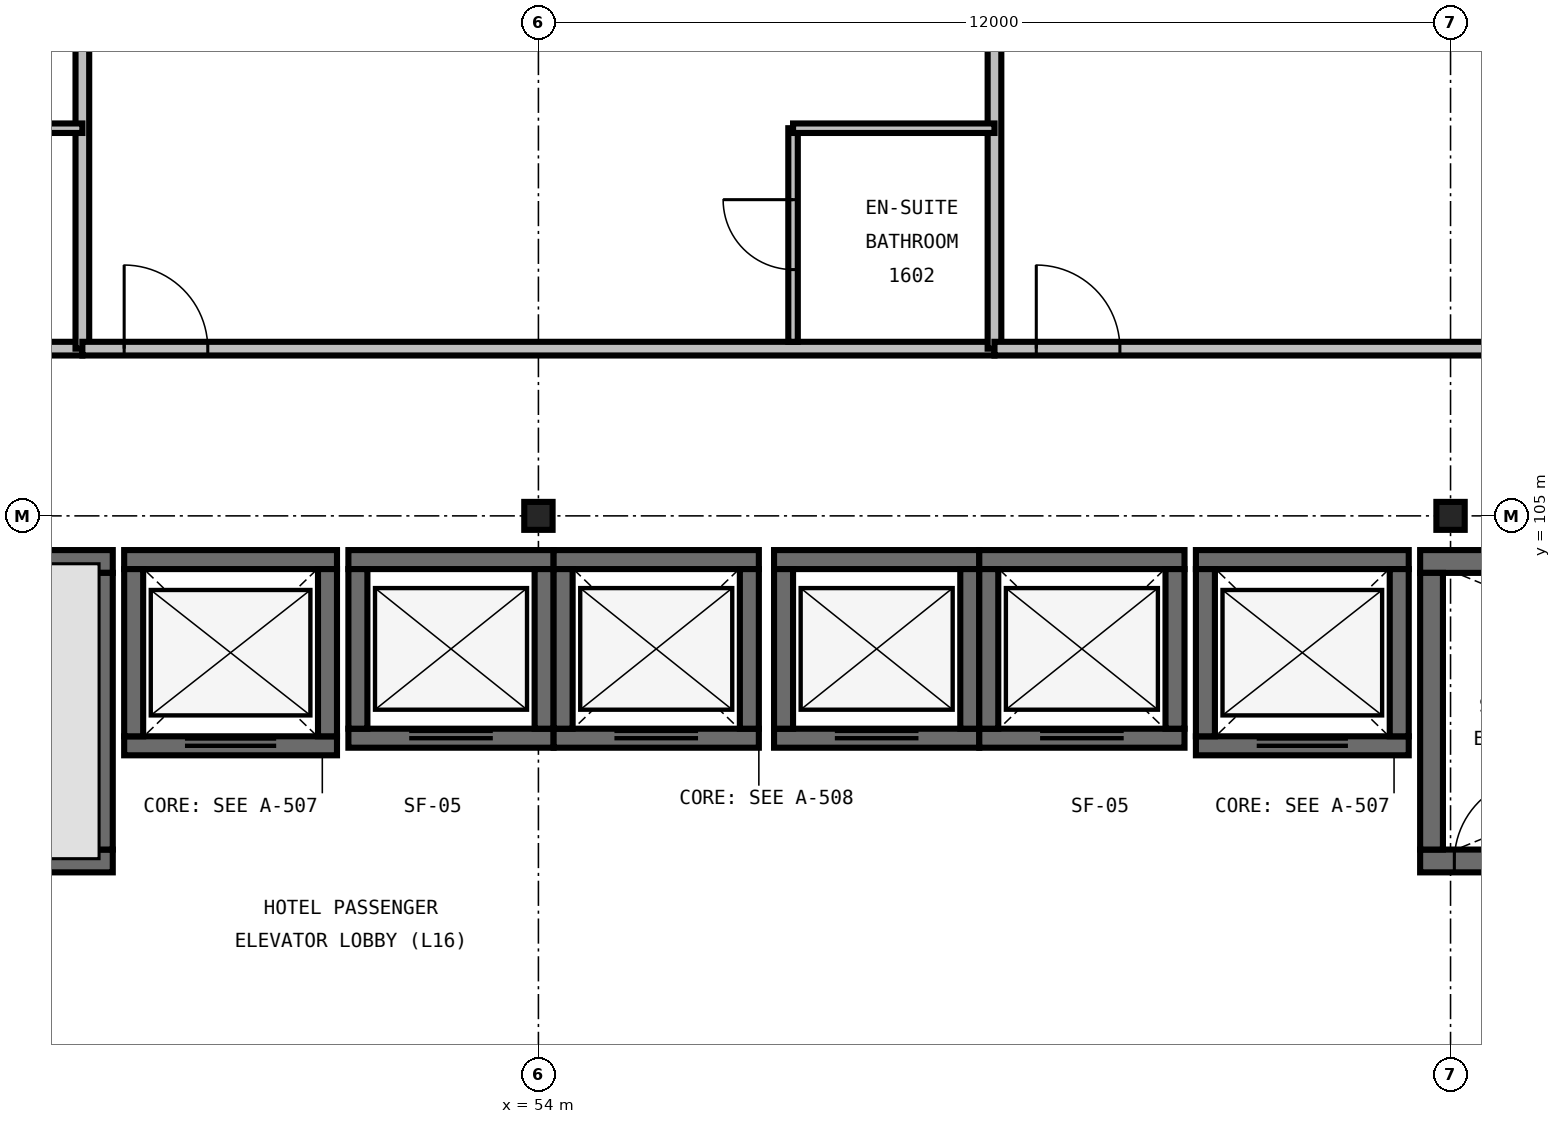
"""IFC4 building model, lengths in metres.
Left out: names, types, materials, properties, quantities, classifications, styles, units other than length and angle.
Written with IfcOpenShell. Run it as: python <this file> out.ifc"""

import sys

from ifc_helpers import new_model, si_unit, direction, frame, frame_2d, origin, origin_2d, place, context, subcontext, project, spatial, rectangle, i_section, extrude, element, fill, save


model = new_model("IFC4")
c1 = context("Model", 3, precision=1e-05, world=origin(), true_north=direction((0.0, 1.0)))
c2 = subcontext(c1, "Body", "Model", "MODEL_VIEW")
j1 = project(units=[si_unit("LENGTHUNIT", "METRE"), si_unit("PLANEANGLEUNIT", "RADIAN")], contexts=[c1])
p1 = place(None, origin())
s1 = spatial("IfcSite", under=j1, at=p1, CompositionType="ELEMENT")
p2 = place(p1, origin())
s2 = spatial("IfcBuilding", under=s1, at=p2, CompositionType="ELEMENT")
p3 = place(p2, frame((0.0, 0.0, 67.2)))
s3 = spatial("IfcBuildingStorey", under=s2, at=p3, CompositionType="ELEMENT", Elevation=67.2)
for number, where, z_axis, x_axis in (
    (1, (54.0, 105.0, 0.0), (0.0, 0.0, 1.0), (1.0, 0.0, 0.0)),
    (2, (66.0, 105.0, 0.0), (0.0, 0.0, 1.0), (1.0, 0.0, 0.0)),
):
    element("IfcColumn", number, at=place(p3, frame(where, z_axis=z_axis, x_axis=x_axis)), inside=s3, PredefinedType="COLUMN", context=c2, shape_type="SweptSolid", body=[
        extrude(i_section(OverallWidth=0.373, OverallDepth=0.368, WebThickness=0.015, FlangeThickness=0.024, FilletRadius=0.031, at=origin_2d()), origin(), (0.0, 0.0, 1.0), 3.6),
    ])
p4 = place(p3, frame((38.6, 100.46, 0.0), z_axis=(0.0, 0.0, 1.0), x_axis=(1.0, 0.0, 0.0)))
e3 = element("IfcWall", 3, at=p4, inside=s3, PredefinedType="SHEAR", context=c2, shape_type="SweptSolid", body=[
    extrude(rectangle(XDim=9.8, YDim=0.3, at=frame_2d((4.9, 0.0))), origin(), (0.0, 0.0, 1.0), 3.6),
])
p5 = place(p4, frame((0.45, 0.0, 0.0)))
e4 = element("IfcOpeningElement", 4, at=p5, cuts=e3, PredefinedType="OPENING", context=c2, shape_type="SweptSolid", body=[
    extrude(rectangle(XDim=1.1, YDim=2.2, at=frame_2d((0.55, 1.1))), frame((0.0, 0.165, 0.0), z_axis=(0.0, -1.0, 0.0), x_axis=(1.0, 0.0, 0.0)), (0.0, 0.0, 1.0), 0.33),
])
p6 = place(p3, frame((48.4, 104.4, 0.0), z_axis=(0.0, 0.0, 1.0), x_axis=(-1.0, 0.0, 0.0)))
e5 = element("IfcWall", 5, at=p6, inside=s3, PredefinedType="SHEAR", context=c2, shape_type="SweptSolid", body=[
    extrude(rectangle(XDim=9.8, YDim=0.3, at=frame_2d((4.9, 0.0))), origin(), (0.0, 0.0, 1.0), 3.6),
])
p7 = place(p3, frame((48.25, 100.61, 0.0), z_axis=(0.0, 0.0, 1.0), x_axis=(0.0, 1.0, 0.0)))
e6 = element("IfcWall", 6, at=p7, inside=s3, PredefinedType="SHEAR", context=c2, shape_type="SweptSolid", body=[
    extrude(rectangle(XDim=3.64, YDim=0.3, at=frame_2d((1.82, 0.0))), origin(), (0.0, 0.0, 1.0), 3.6),
])
p8 = place(p3, frame((65.6, 100.46, 0.0), z_axis=(0.0, 0.0, 1.0), x_axis=(1.0, 0.0, 0.0)))
e7 = element("IfcWall", 7, at=p8, inside=s3, PredefinedType="SHEAR", context=c2, shape_type="SweptSolid", body=[
    extrude(rectangle(XDim=9.8, YDim=0.3, at=frame_2d((4.9, 0.0))), origin(), (0.0, 0.0, 1.0), 3.6),
])
p9 = place(p8, frame((0.45, 0.0, 0.0)))
e8 = element("IfcOpeningElement", 8, at=p9, cuts=e7, PredefinedType="OPENING", context=c2, shape_type="SweptSolid", body=[
    extrude(rectangle(XDim=1.1, YDim=2.2, at=frame_2d((0.55, 1.1))), frame((0.0, 0.165, 0.0), z_axis=(0.0, -1.0, 0.0), x_axis=(1.0, 0.0, 0.0)), (0.0, 0.0, 1.0), 0.33),
])
p10 = place(p3, frame((75.4, 104.4, 0.0), z_axis=(0.0, 0.0, 1.0), x_axis=(-1.0, 0.0, 0.0)))
e9 = element("IfcWall", 9, at=p10, inside=s3, PredefinedType="SHEAR", context=c2, shape_type="SweptSolid", body=[
    extrude(rectangle(XDim=9.8, YDim=0.3, at=frame_2d((4.9, 0.0))), origin(), (0.0, 0.0, 1.0), 3.6),
])
p11 = place(p3, frame((65.75, 104.25, 0.0), z_axis=(0.0, 0.0, 1.0), x_axis=(0.0, -1.0, 0.0)))
e10 = element("IfcWall", 10, at=p11, inside=s3, PredefinedType="SHEAR", context=c2, shape_type="SweptSolid", body=[
    extrude(rectangle(XDim=3.64, YDim=0.3, at=frame_2d((1.82, 0.0))), origin(), (0.0, 0.0, 1.0), 3.6),
])
p12 = place(p3, frame((48.55, 101.975, 0.0), z_axis=(0.0, 0.0, 1.0), x_axis=(1.0, 0.0, 0.0)))
e11 = element("IfcWall", 11, at=p12, inside=s3, PredefinedType="SHEAR", context=c2, shape_type="SweptSolid", body=[
    extrude(rectangle(XDim=2.8, YDim=0.25, at=frame_2d((1.4, 0.0))), origin(), (0.0, 0.0, 1.0), 3.6),
])
p13 = place(p12, frame((0.8, 0.0, 0.0)))
e12 = element("IfcOpeningElement", 12, at=p13, cuts=e11, PredefinedType="OPENING", context=c2, shape_type="SweptSolid", body=[
    extrude(rectangle(XDim=1.2, YDim=2.2, at=frame_2d((0.6, 1.1))), frame((0.0, 0.14, 0.0), z_axis=(0.0, -1.0, 0.0), x_axis=(1.0, 0.0, 0.0)), (0.0, 0.0, 1.0), 0.28),
])
p14 = place(p3, frame((51.35, 104.425, 0.0), z_axis=(0.0, 0.0, 1.0), x_axis=(-1.0, 0.0, 0.0)))
e13 = element("IfcWall", 13, at=p14, inside=s3, PredefinedType="SHEAR", context=c2, shape_type="SweptSolid", body=[
    extrude(rectangle(XDim=2.8, YDim=0.25, at=frame_2d((1.4, 0.0))), origin(), (0.0, 0.0, 1.0), 3.6),
])
for number, where, z_axis, x_axis in (
    (14, (48.675, 104.3, 0.0), (0.0, 0.0, 1.0), (0.0, -1.0, 0.0)),
    (15, (51.225, 102.1, 0.0), (0.0, 0.0, 1.0), (0.0, 1.0, 0.0)),
):
    element("IfcWall", number, at=place(p3, frame(where, z_axis=z_axis, x_axis=x_axis)), inside=s3, PredefinedType="SHEAR", context=c2, shape_type="SweptSolid", body=[
        extrude(rectangle(XDim=2.2, YDim=0.25, at=frame_2d((1.1, 0.0))), origin(), (0.0, 0.0, 1.0), 3.6),
    ])
p15 = place(p3, frame((62.65, 101.975, 0.0), z_axis=(0.0, 0.0, 1.0), x_axis=(1.0, 0.0, 0.0)))
e16 = element("IfcWall", 16, at=p15, inside=s3, PredefinedType="SHEAR", context=c2, shape_type="SweptSolid", body=[
    extrude(rectangle(XDim=2.8, YDim=0.25, at=frame_2d((1.4, 0.0))), origin(), (0.0, 0.0, 1.0), 3.6),
])
p16 = place(p15, frame((0.8, 0.0, 0.0)))
e17 = element("IfcOpeningElement", 17, at=p16, cuts=e16, PredefinedType="OPENING", context=c2, shape_type="SweptSolid", body=[
    extrude(rectangle(XDim=1.2, YDim=2.2, at=frame_2d((0.6, 1.1))), frame((0.0, 0.14, 0.0), z_axis=(0.0, -1.0, 0.0), x_axis=(1.0, 0.0, 0.0)), (0.0, 0.0, 1.0), 0.28),
])
p17 = place(p3, frame((65.45, 104.425, 0.0), z_axis=(0.0, 0.0, 1.0), x_axis=(-1.0, 0.0, 0.0)))
e18 = element("IfcWall", 18, at=p17, inside=s3, PredefinedType="SHEAR", context=c2, shape_type="SweptSolid", body=[
    extrude(rectangle(XDim=2.8, YDim=0.25, at=frame_2d((1.4, 0.0))), origin(), (0.0, 0.0, 1.0), 3.6),
])
for number, where, z_axis, x_axis in (
    (19, (62.775, 104.3, 0.0), (0.0, 0.0, 1.0), (0.0, -1.0, 0.0)),
    (20, (65.325, 102.1, 0.0), (0.0, 0.0, 1.0), (0.0, 1.0, 0.0)),
):
    element("IfcWall", number, at=place(p3, frame(where, z_axis=z_axis, x_axis=x_axis)), inside=s3, PredefinedType="SHEAR", context=c2, shape_type="SweptSolid", body=[
        extrude(rectangle(XDim=2.2, YDim=0.25, at=frame_2d((1.1, 0.0))), origin(), (0.0, 0.0, 1.0), 3.6),
    ])
p18 = place(p3, frame((51.5, 102.075, 0.0), z_axis=(0.0, 0.0, 1.0), x_axis=(1.0, 0.0, 0.0)))
e21 = element("IfcWall", 21, at=p18, inside=s3, PredefinedType="SHEAR", context=c2, shape_type="SweptSolid", body=[
    extrude(rectangle(XDim=2.7, YDim=0.25, at=frame_2d((1.35, 0.0))), origin(), (0.0, 0.0, 1.0), 3.6),
])
p19 = place(p18, frame((0.8, 0.0, 0.0)))
e22 = element("IfcOpeningElement", 22, at=p19, cuts=e21, PredefinedType="OPENING", context=c2, shape_type="SweptSolid", body=[
    extrude(rectangle(XDim=1.1, YDim=2.2, at=frame_2d((0.55, 1.1))), frame((0.0, 0.14, 0.0), z_axis=(0.0, -1.0, 0.0), x_axis=(1.0, 0.0, 0.0)), (0.0, 0.0, 1.0), 0.28),
])
p20 = place(p3, frame((54.2, 104.425, 0.0), z_axis=(0.0, 0.0, 1.0), x_axis=(-1.0, 0.0, 0.0)))
e23 = element("IfcWall", 23, at=p20, inside=s3, PredefinedType="SHEAR", context=c2, shape_type="SweptSolid", body=[
    extrude(rectangle(XDim=2.7, YDim=0.25, at=frame_2d((1.35, 0.0))), origin(), (0.0, 0.0, 1.0), 3.6),
])
for number, where, z_axis, x_axis in (
    (24, (51.625, 104.3, 0.0), (0.0, 0.0, 1.0), (0.0, -1.0, 0.0)),
    (25, (54.075, 102.2, 0.0), (0.0, 0.0, 1.0), (0.0, 1.0, 0.0)),
):
    element("IfcWall", number, at=place(p3, frame(where, z_axis=z_axis, x_axis=x_axis)), inside=s3, PredefinedType="SHEAR", context=c2, shape_type="SweptSolid", body=[
        extrude(rectangle(XDim=2.1, YDim=0.25, at=frame_2d((1.05, 0.0))), origin(), (0.0, 0.0, 1.0), 3.6),
    ])
p21 = place(p3, frame((54.2, 102.075, 0.0), z_axis=(0.0, 0.0, 1.0), x_axis=(1.0, 0.0, 0.0)))
e26 = element("IfcWall", 26, at=p21, inside=s3, PredefinedType="SHEAR", context=c2, shape_type="SweptSolid", body=[
    extrude(rectangle(XDim=2.7, YDim=0.25, at=frame_2d((1.35, 0.0))), origin(), (0.0, 0.0, 1.0), 3.6),
])
p22 = place(p21, frame((0.8, 0.0, 0.0)))
e27 = element("IfcOpeningElement", 27, at=p22, cuts=e26, PredefinedType="OPENING", context=c2, shape_type="SweptSolid", body=[
    extrude(rectangle(XDim=1.1, YDim=2.2, at=frame_2d((0.55, 1.1))), frame((0.0, 0.14, 0.0), z_axis=(0.0, -1.0, 0.0), x_axis=(1.0, 0.0, 0.0)), (0.0, 0.0, 1.0), 0.28),
])
p23 = place(p3, frame((56.9, 104.425, 0.0), z_axis=(0.0, 0.0, 1.0), x_axis=(-1.0, 0.0, 0.0)))
e28 = element("IfcWall", 28, at=p23, inside=s3, PredefinedType="SHEAR", context=c2, shape_type="SweptSolid", body=[
    extrude(rectangle(XDim=2.7, YDim=0.25, at=frame_2d((1.35, 0.0))), origin(), (0.0, 0.0, 1.0), 3.6),
])
for number, where, z_axis, x_axis in (
    (29, (54.325, 104.3, 0.0), (0.0, 0.0, 1.0), (0.0, -1.0, 0.0)),
    (30, (56.775, 102.2, 0.0), (0.0, 0.0, 1.0), (0.0, 1.0, 0.0)),
):
    element("IfcWall", number, at=place(p3, frame(where, z_axis=z_axis, x_axis=x_axis)), inside=s3, PredefinedType="SHEAR", context=c2, shape_type="SweptSolid", body=[
        extrude(rectangle(XDim=2.1, YDim=0.25, at=frame_2d((1.05, 0.0))), origin(), (0.0, 0.0, 1.0), 3.6),
    ])
p24 = place(p3, frame((57.1, 102.075, 0.0), z_axis=(0.0, 0.0, 1.0), x_axis=(1.0, 0.0, 0.0)))
e31 = element("IfcWall", 31, at=p24, inside=s3, PredefinedType="SHEAR", context=c2, shape_type="SweptSolid", body=[
    extrude(rectangle(XDim=2.7, YDim=0.25, at=frame_2d((1.35, 0.0))), origin(), (0.0, 0.0, 1.0), 3.6),
])
p25 = place(p24, frame((0.8, 0.0, 0.0)))
e32 = element("IfcOpeningElement", 32, at=p25, cuts=e31, PredefinedType="OPENING", context=c2, shape_type="SweptSolid", body=[
    extrude(rectangle(XDim=1.1, YDim=2.2, at=frame_2d((0.55, 1.1))), frame((0.0, 0.14, 0.0), z_axis=(0.0, -1.0, 0.0), x_axis=(1.0, 0.0, 0.0)), (0.0, 0.0, 1.0), 0.28),
])
p26 = place(p3, frame((59.8, 104.425, 0.0), z_axis=(0.0, 0.0, 1.0), x_axis=(-1.0, 0.0, 0.0)))
e33 = element("IfcWall", 33, at=p26, inside=s3, PredefinedType="SHEAR", context=c2, shape_type="SweptSolid", body=[
    extrude(rectangle(XDim=2.7, YDim=0.25, at=frame_2d((1.35, 0.0))), origin(), (0.0, 0.0, 1.0), 3.6),
])
for number, where, z_axis, x_axis in (
    (34, (57.225, 104.3, 0.0), (0.0, 0.0, 1.0), (0.0, -1.0, 0.0)),
    (35, (59.675, 102.2, 0.0), (0.0, 0.0, 1.0), (0.0, 1.0, 0.0)),
):
    element("IfcWall", number, at=place(p3, frame(where, z_axis=z_axis, x_axis=x_axis)), inside=s3, PredefinedType="SHEAR", context=c2, shape_type="SweptSolid", body=[
        extrude(rectangle(XDim=2.1, YDim=0.25, at=frame_2d((1.05, 0.0))), origin(), (0.0, 0.0, 1.0), 3.6),
    ])
p27 = place(p3, frame((59.8, 102.075, 0.0), z_axis=(0.0, 0.0, 1.0), x_axis=(1.0, 0.0, 0.0)))
e36 = element("IfcWall", 36, at=p27, inside=s3, PredefinedType="SHEAR", context=c2, shape_type="SweptSolid", body=[
    extrude(rectangle(XDim=2.7, YDim=0.25, at=frame_2d((1.35, 0.0))), origin(), (0.0, 0.0, 1.0), 3.6),
])
p28 = place(p27, frame((0.8, 0.0, 0.0)))
e37 = element("IfcOpeningElement", 37, at=p28, cuts=e36, PredefinedType="OPENING", context=c2, shape_type="SweptSolid", body=[
    extrude(rectangle(XDim=1.1, YDim=2.2, at=frame_2d((0.55, 1.1))), frame((0.0, 0.14, 0.0), z_axis=(0.0, -1.0, 0.0), x_axis=(1.0, 0.0, 0.0)), (0.0, 0.0, 1.0), 0.28),
])
p29 = place(p3, frame((62.5, 104.425, 0.0), z_axis=(0.0, 0.0, 1.0), x_axis=(-1.0, 0.0, 0.0)))
e38 = element("IfcWall", 38, at=p29, inside=s3, PredefinedType="SHEAR", context=c2, shape_type="SweptSolid", body=[
    extrude(rectangle(XDim=2.7, YDim=0.25, at=frame_2d((1.35, 0.0))), origin(), (0.0, 0.0, 1.0), 3.6),
])
for number, where, z_axis, x_axis in (
    (39, (59.925, 104.3, 0.0), (0.0, 0.0, 1.0), (0.0, -1.0, 0.0)),
    (40, (62.375, 102.2, 0.0), (0.0, 0.0, 1.0), (0.0, 1.0, 0.0)),
):
    element("IfcWall", number, at=place(p3, frame(where, z_axis=z_axis, x_axis=x_axis)), inside=s3, PredefinedType="SHEAR", context=c2, shape_type="SweptSolid", body=[
        extrude(rectangle(XDim=2.1, YDim=0.25, at=frame_2d((1.05, 0.0))), origin(), (0.0, 0.0, 1.0), 3.6),
    ])
p30 = place(p3, frame((36.085, 107.2, 0.0), z_axis=(0.0, 0.0, 1.0), x_axis=(1.0, 0.0, 0.0)))
e41 = element("IfcWall", 41, at=p30, inside=s3, PredefinedType="PARTITIONING", context=c2, shape_type="SweptSolid", body=[
    extrude(rectangle(XDim=11.915, YDim=0.18, at=frame_2d((5.957, 0.0))), origin(), (0.0, 0.0, 1.0), 3.28),
])
p31 = place(p30, frame((0.55, 0.0, 0.0)))
e42 = element("IfcOpeningElement", 42, at=p31, cuts=e41, PredefinedType="OPENING", context=c2, shape_type="SweptSolid", body=[
    extrude(rectangle(XDim=1.1, YDim=2.2, at=frame_2d((0.55, 1.1))), frame((0.0, 0.105, 0.0), z_axis=(0.0, -1.0, 0.0), x_axis=(1.0, 0.0, 0.0)), (0.0, 0.0, 1.0), 0.21),
])
p32 = place(p3, frame((48.0, 107.2, 0.0), z_axis=(0.0, 0.0, 1.0), x_axis=(0.0, 1.0, 0.0)))
e43 = element("IfcWall", 43, at=p32, inside=s3, PredefinedType="PARTITIONING", context=c2, shape_type="SweptSolid", body=[
    extrude(rectangle(XDim=9.64, YDim=0.18, at=frame_2d((4.82, 0.0))), origin(), (0.0, 0.0, 1.0), 3.28),
])
p33 = place(p3, frame((45.35, 110.1, 0.0), z_axis=(0.0, 0.0, 1.0), x_axis=(1.0, 0.0, 0.0)))
e44 = element("IfcWall", 44, at=p33, inside=s3, PredefinedType="PARTITIONING", context=c2, shape_type="SweptSolid", body=[
    extrude(rectangle(XDim=2.65, YDim=0.125, at=frame_2d((1.325, 0.0))), origin(), (0.0, 0.0, 1.0), 3.28),
])
p34 = place(p3, frame((48.0, 107.2, 0.0), z_axis=(0.0, 0.0, 1.0), x_axis=(1.0, 0.0, 0.0)))
e45 = element("IfcWall", 45, at=p34, inside=s3, PredefinedType="PARTITIONING", context=c2, shape_type="SweptSolid", body=[
    extrude(rectangle(XDim=12.0, YDim=0.18, at=frame_2d((6.0, 0.0))), origin(), (0.0, 0.0, 1.0), 3.28),
])
p35 = place(p34, frame((0.55, 0.0, 0.0)))
e46 = element("IfcOpeningElement", 46, at=p35, cuts=e45, PredefinedType="OPENING", context=c2, shape_type="SweptSolid", body=[
    extrude(rectangle(XDim=1.1, YDim=2.2, at=frame_2d((0.55, 1.1))), frame((0.0, 0.105, 0.0), z_axis=(0.0, -1.0, 0.0), x_axis=(1.0, 0.0, 0.0)), (0.0, 0.0, 1.0), 0.21),
])
p36 = place(p3, frame((60.0, 107.2, 0.0), z_axis=(0.0, 0.0, 1.0), x_axis=(0.0, 1.0, 0.0)))
e47 = element("IfcWall", 47, at=p36, inside=s3, PredefinedType="PARTITIONING", context=c2, shape_type="SweptSolid", body=[
    extrude(rectangle(XDim=9.64, YDim=0.18, at=frame_2d((4.82, 0.0))), origin(), (0.0, 0.0, 1.0), 3.28),
])
p37 = place(p3, frame((57.35, 107.29, 0.0), z_axis=(0.0, 0.0, 1.0), x_axis=(0.0, 1.0, 0.0)))
e48 = element("IfcWall", 48, at=p37, inside=s3, PredefinedType="PARTITIONING", context=c2, shape_type="SweptSolid", body=[
    extrude(rectangle(XDim=2.81, YDim=0.125, at=frame_2d((1.405, 0.0))), origin(), (0.0, 0.0, 1.0), 3.28),
])
p38 = place(p37, frame((0.95, 0.0, 0.0)))
e49 = element("IfcOpeningElement", 49, at=p38, cuts=e48, PredefinedType="OPENING", context=c2, shape_type="SweptSolid", body=[
    extrude(rectangle(XDim=0.92, YDim=2.1, at=frame_2d((0.46, 1.05))), frame((0.0, 0.077, 0.0), z_axis=(0.0, -1.0, 0.0), x_axis=(1.0, 0.0, 0.0)), (0.0, 0.0, 1.0), 0.155),
])
p39 = place(p3, frame((57.35, 110.1, 0.0), z_axis=(0.0, 0.0, 1.0), x_axis=(1.0, 0.0, 0.0)))
e50 = element("IfcWall", 50, at=p39, inside=s3, PredefinedType="PARTITIONING", context=c2, shape_type="SweptSolid", body=[
    extrude(rectangle(XDim=2.65, YDim=0.125, at=frame_2d((1.325, 0.0))), origin(), (0.0, 0.0, 1.0), 3.28),
])
p40 = place(p3, frame((60.0, 107.2, 0.0), z_axis=(0.0, 0.0, 1.0), x_axis=(1.0, 0.0, 0.0)))
e51 = element("IfcWall", 51, at=p40, inside=s3, PredefinedType="PARTITIONING", context=c2, shape_type="SweptSolid", body=[
    extrude(rectangle(XDim=12.0, YDim=0.18, at=frame_2d((6.0, 0.0))), origin(), (0.0, 0.0, 1.0), 3.28),
])
p41 = place(p40, frame((0.55, 0.0, 0.0)))
e52 = element("IfcOpeningElement", 52, at=p41, cuts=e51, PredefinedType="OPENING", context=c2, shape_type="SweptSolid", body=[
    extrude(rectangle(XDim=1.1, YDim=2.2, at=frame_2d((0.55, 1.1))), frame((0.0, 0.105, 0.0), z_axis=(0.0, -1.0, 0.0), x_axis=(1.0, 0.0, 0.0)), (0.0, 0.0, 1.0), 0.21),
])
p42 = place(p9, origin())
e53 = element("IfcDoor", 53, at=p42, inside=s3, OperationType="SINGLE_SWING_RIGHT", PredefinedType="DOOR", context=c2, shape_type="SweptSolid", body=[
    extrude(rectangle(XDim=1.1, YDim=2.2, at=frame_2d((0.55, 1.1))), frame((0.0, 0.025, 0.0), z_axis=(0.0, -1.0, 0.0), x_axis=(1.0, 0.0, 0.0)), (0.0, 0.0, 1.0), 0.05),
])
fill(e8, e53)
p43 = place(p13, origin())
e54 = element("IfcDoor", 54, at=p43, inside=s3, OperationType="DOUBLE_DOOR_SLIDING", PredefinedType="DOOR", context=c2, shape_type="SweptSolid", body=[
    extrude(rectangle(XDim=1.2, YDim=2.2, at=frame_2d((0.6, 1.1))), frame((0.0, 0.025, 0.0), z_axis=(0.0, -1.0, 0.0), x_axis=(1.0, 0.0, 0.0)), (0.0, 0.0, 1.0), 0.05),
])
fill(e12, e54)
p44 = place(p16, origin())
e55 = element("IfcDoor", 55, at=p44, inside=s3, OperationType="DOUBLE_DOOR_SLIDING", PredefinedType="DOOR", context=c2, shape_type="SweptSolid", body=[
    extrude(rectangle(XDim=1.2, YDim=2.2, at=frame_2d((0.6, 1.1))), frame((0.0, 0.025, 0.0), z_axis=(0.0, -1.0, 0.0), x_axis=(1.0, 0.0, 0.0)), (0.0, 0.0, 1.0), 0.05),
])
fill(e17, e55)
p45 = place(p19, origin())
e56 = element("IfcDoor", 56, at=p45, inside=s3, OperationType="DOUBLE_DOOR_SLIDING", PredefinedType="DOOR", context=c2, shape_type="SweptSolid", body=[
    extrude(rectangle(XDim=1.1, YDim=2.2, at=frame_2d((0.55, 1.1))), frame((0.0, 0.025, 0.0), z_axis=(0.0, -1.0, 0.0), x_axis=(1.0, 0.0, 0.0)), (0.0, 0.0, 1.0), 0.05),
])
fill(e22, e56)
p46 = place(p22, origin())
e57 = element("IfcDoor", 57, at=p46, inside=s3, OperationType="DOUBLE_DOOR_SLIDING", PredefinedType="DOOR", context=c2, shape_type="SweptSolid", body=[
    extrude(rectangle(XDim=1.1, YDim=2.2, at=frame_2d((0.55, 1.1))), frame((0.0, 0.025, 0.0), z_axis=(0.0, -1.0, 0.0), x_axis=(1.0, 0.0, 0.0)), (0.0, 0.0, 1.0), 0.05),
])
fill(e27, e57)
p47 = place(p25, origin())
e58 = element("IfcDoor", 58, at=p47, inside=s3, OperationType="DOUBLE_DOOR_SLIDING", PredefinedType="DOOR", context=c2, shape_type="SweptSolid", body=[
    extrude(rectangle(XDim=1.1, YDim=2.2, at=frame_2d((0.55, 1.1))), frame((0.0, 0.025, 0.0), z_axis=(0.0, -1.0, 0.0), x_axis=(1.0, 0.0, 0.0)), (0.0, 0.0, 1.0), 0.05),
])
fill(e32, e58)
p48 = place(p28, origin())
e59 = element("IfcDoor", 59, at=p48, inside=s3, OperationType="DOUBLE_DOOR_SLIDING", PredefinedType="DOOR", context=c2, shape_type="SweptSolid", body=[
    extrude(rectangle(XDim=1.1, YDim=2.2, at=frame_2d((0.55, 1.1))), frame((0.0, 0.025, 0.0), z_axis=(0.0, -1.0, 0.0), x_axis=(1.0, 0.0, 0.0)), (0.0, 0.0, 1.0), 0.05),
])
fill(e37, e59)
p49 = place(p35, origin())
e60 = element("IfcDoor", 60, at=p49, inside=s3, OperationType="SINGLE_SWING_LEFT", PredefinedType="DOOR", context=c2, shape_type="SweptSolid", body=[
    extrude(rectangle(XDim=1.1, YDim=2.2, at=frame_2d((0.55, 1.1))), frame((0.0, 0.025, 0.0), z_axis=(0.0, -1.0, 0.0), x_axis=(1.0, 0.0, 0.0)), (0.0, 0.0, 1.0), 0.05),
])
fill(e46, e60)
p50 = place(p38, origin())
e61 = element("IfcDoor", 61, at=p50, inside=s3, OperationType="SINGLE_SWING_RIGHT", PredefinedType="DOOR", context=c2, shape_type="SweptSolid", body=[
    extrude(rectangle(XDim=0.92, YDim=2.1, at=frame_2d((0.46, 1.05))), frame((0.0, 0.025, 0.0), z_axis=(0.0, -1.0, 0.0), x_axis=(1.0, 0.0, 0.0)), (0.0, 0.0, 1.0), 0.05),
])
fill(e49, e61)
p51 = place(p41, origin())
e62 = element("IfcDoor", 62, at=p51, inside=s3, OperationType="SINGLE_SWING_LEFT", PredefinedType="DOOR", context=c2, shape_type="SweptSolid", body=[
    extrude(rectangle(XDim=1.1, YDim=2.2, at=frame_2d((0.55, 1.1))), frame((0.0, 0.025, 0.0), z_axis=(0.0, -1.0, 0.0), x_axis=(1.0, 0.0, 0.0)), (0.0, 0.0, 1.0), 0.05),
])
fill(e52, e62)
save(model, sys.argv[1])
